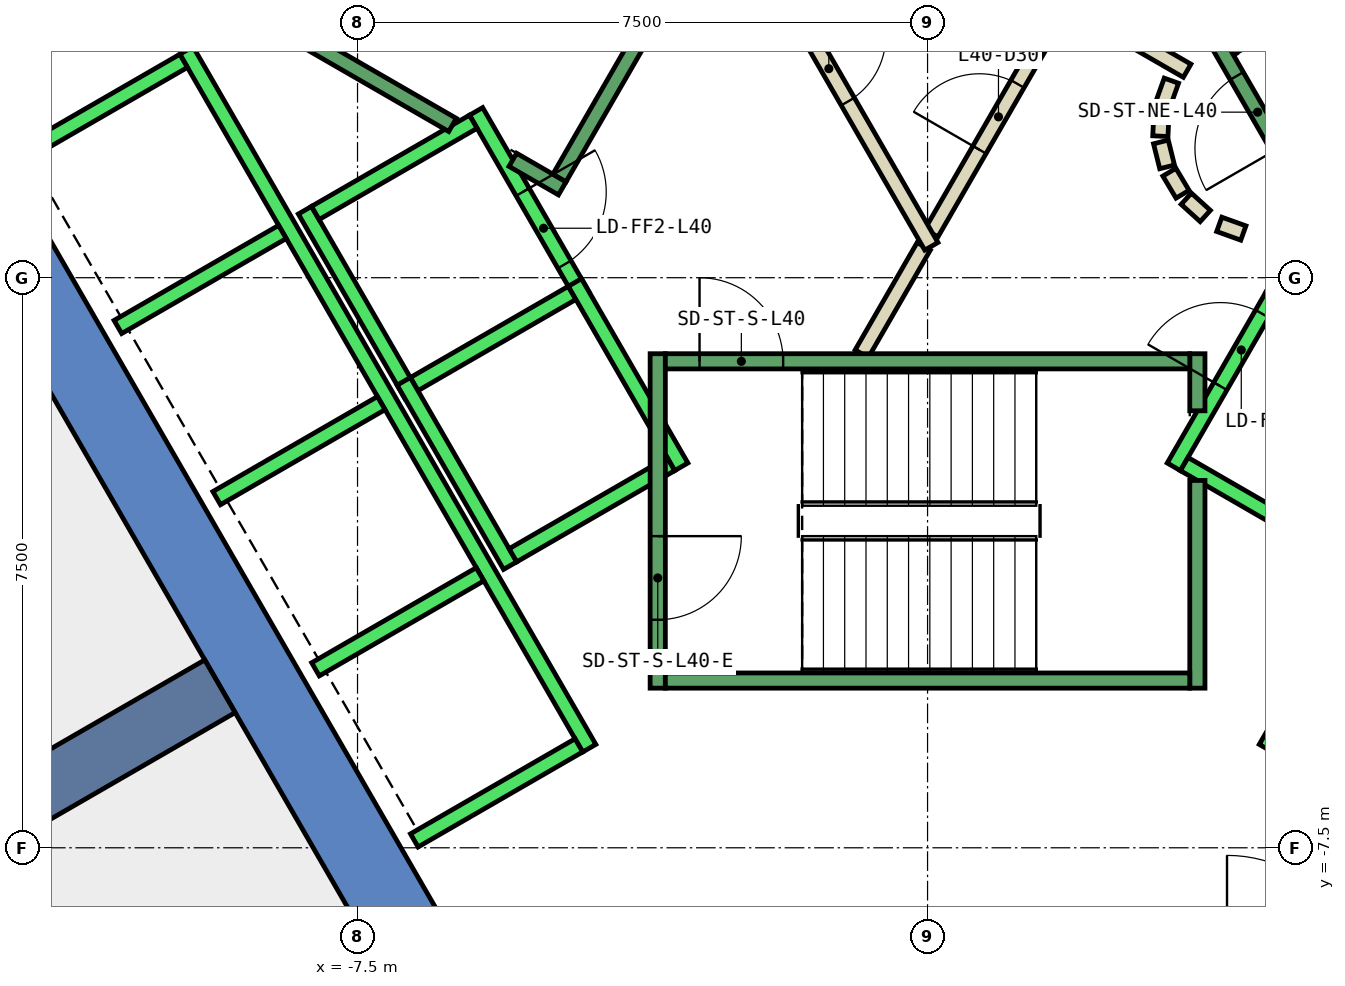
"""IFC4 building model, lengths in metres.
Left out: names, types, materials, properties, quantities, classifications, styles, units other than length and angle.
Written with IfcOpenShell. Run it as: python <this file> out.ifc"""

import sys

from ifc_helpers import new_model, si_unit, direction, frame, frame_2d, origin, place, context, subcontext, project, spatial, polyline, rectangle, outline, extrude, element, fill, save


model = new_model("IFC4")
c1 = context("Model", 3, precision=1e-05, world=origin(), true_north=direction((0.0, 1.0)))
c2 = subcontext(c1, "Body", "Model", "MODEL_VIEW")
j1 = project(units=[si_unit("LENGTHUNIT", "METRE"), si_unit("PLANEANGLEUNIT", "RADIAN")], contexts=[c1])
p1 = place(None, origin())
s1 = spatial("IfcSite", under=j1, at=p1, CompositionType="ELEMENT")
p2 = place(p1, origin())
s2 = spatial("IfcBuilding", under=s1, at=p2, CompositionType="ELEMENT")
p3 = place(p2, frame((0.0, 0.0, 180.2)))
s3 = spatial("IfcBuildingStorey", under=s2, at=p3, CompositionType="ELEMENT", Elevation=180.2)
p4 = place(p3, frame((0.0, 0.0, -0.4)))
e1 = element("IfcWall", 1, at=p4, inside=s3, PredefinedType="SHEAR", context=c2, shape_type="SweptSolid", body=[
    extrude(outline(polyline([(-13.856, 2.5), (-6.928, -9.5), (-6.351, -8.5), (-12.702, 2.5), (-13.856, 2.5)])), origin(), (0.0, 0.0, 1.0), 4.0),
])
p5 = place(p3, frame((-9.31, -5.375, -0.4), z_axis=(0.0, 0.0, 1.0), x_axis=(-0.866017533419, -0.500013631625, 0.0)))
e2 = element("IfcWall", 2, at=p5, inside=s3, PredefinedType="SHEAR", context=c2, shape_type="SweptSolid", body=[
    extrude(rectangle(XDim=9.0, YDim=0.8, at=frame_2d((4.5, 0.0))), origin(), (0.0, 0.0, 1.0), 4.0),
])
p6 = place(p3, frame((-0.866, -1.0, 0.0), z_axis=(0.0, 0.0, 1.0), x_axis=(0.500033287521, 0.866006184372, 0.0)))
e3 = element("IfcWall", 3, at=p6, inside=s3, PredefinedType="PARTITIONING", context=c2, shape_type="SweptSolid", body=[
    extrude(rectangle(XDim=1.632, YDim=0.2, at=frame_2d((0.816, 0.0))), origin(), (0.0, 0.0, 1.0), 3.6),
])
p7 = place(p3, frame((0.05, 0.587, 0.0), z_axis=(0.0, 0.0, 1.0), x_axis=(0.500028932171, 0.866008699143, 0.0)))
e4 = element("IfcWall", 4, at=p7, inside=s3, PredefinedType="PARTITIONING", context=c2, shape_type="SweptSolid", body=[
    extrude(rectangle(XDim=3.632, YDim=0.2, at=frame_2d((1.816, 0.0))), origin(), (0.0, 0.0, 1.0), 3.6),
])
p8 = place(p7, frame((1.266, 0.0, 0.0)))
e5 = element("IfcOpeningElement", 5, at=p8, cuts=e4, PredefinedType="OPENING", context=c2, shape_type="SweptSolid", body=[
    extrude(rectangle(XDim=1.0, YDim=2.1, at=frame_2d((0.5, 1.05))), frame((0.0, 0.11, 0.0), z_axis=(0.0, -1.0, 0.0), x_axis=(1.0, 0.0, 0.0)), (0.0, 0.0, 1.0), 0.22),
])
p9 = place(p3, frame((1.903, 3.595, 0.0), z_axis=(0.0, 0.0, 1.0), x_axis=(0.866239139897, -0.499629615326, 0.0)))
e6 = element("IfcWall", 6, at=p9, inside=s3, PredefinedType="PARTITIONING", context=c2, shape_type="SweptSolid", body=[
    extrude(rectangle(XDim=1.745, YDim=0.2, at=frame_2d((0.873, 0.0))), origin(), (0.0, 0.0, 1.0), 3.6),
])
p10 = place(p3, frame((3.208, 2.592, 0.0), z_axis=(0.0, 0.0, 1.0), x_axis=(-0.337388820924, -0.941365382578, 0.0)))
e7 = element("IfcWall", 7, at=p10, inside=s3, PredefinedType="PARTITIONING", context=c2, shape_type="SweptSolid", body=[
    extrude(rectangle(XDim=0.338, YDim=0.2, at=frame_2d((0.169, 0.0))), origin(), (0.0, 0.0, 1.0), 3.6),
])
p11 = place(p3, frame((3.079, 2.199, 0.0), z_axis=(0.0, 0.0, 1.0), x_axis=(-0.047771483479, -0.998858290933, 0.0)))
e8 = element("IfcWall", 8, at=p11, inside=s3, PredefinedType="PARTITIONING", context=c2, shape_type="SweptSolid", body=[
    extrude(rectangle(XDim=0.337, YDim=0.2, at=frame_2d((0.169, 0.0))), origin(), (0.0, 0.0, 1.0), 3.6),
])
p12 = place(p3, frame((3.07, 1.786, 0.0), z_axis=(0.0, 0.0, 1.0), x_axis=(0.242705583207, -0.970099994784, 0.0)))
e9 = element("IfcWall", 9, at=p12, inside=s3, PredefinedType="PARTITIONING", context=c2, shape_type="SweptSolid", body=[
    extrude(rectangle(XDim=0.338, YDim=0.2, at=frame_2d((0.169, 0.0))), origin(), (0.0, 0.0, 1.0), 3.6),
])
for number, where, z_axis, x_axis in (
    (10, (3.182, 1.388, 0.0), (0.0, 0.0, 1.0), (0.512, -0.859, 0.0)),
    (11, (3.404, 1.039, 0.0), (0.0, 0.0, 1.0), (0.74, -0.672, 0.0)),
):
    element("IfcWall", number, at=place(p3, frame(where, z_axis=z_axis, x_axis=x_axis)), inside=s3, PredefinedType="PARTITIONING", context=c2, shape_type="SweptSolid", body=[
        extrude(rectangle(XDim=0.338, YDim=0.2, at=frame_2d((0.169, 0.0))), origin(), (0.0, 0.0, 1.0), 3.6),
    ])
p13 = place(p3, frame((3.838, 0.702, 0.0), z_axis=(0.0, 0.0, 1.0), x_axis=(0.941035081519, -0.338308993895, 0.0)))
e12 = element("IfcWall", 12, at=p13, inside=s3, PredefinedType="PARTITIONING", context=c2, shape_type="SweptSolid", body=[
    extrude(rectangle(XDim=0.337, YDim=0.2, at=frame_2d((0.168, 0.0))), origin(), (0.0, 0.0, 1.0), 3.6),
])
p14 = place(p3, frame((-2.598, 5.0, 0.0), z_axis=(0.0, 0.0, 1.0), x_axis=(0.49995654735, -0.86605048973, 0.0)))
e13 = element("IfcWall", 13, at=p14, inside=s3, PredefinedType="PARTITIONING", context=c2, shape_type="SweptSolid", body=[
    extrude(rectangle(XDim=5.296, YDim=0.2, at=frame_2d((2.648, 0.0))), origin(), (0.0, 0.0, 1.0), 3.6),
])
p15 = place(p14, frame((2.098, 0.0, 0.0)))
e14 = element("IfcOpeningElement", 14, at=p15, cuts=e13, PredefinedType="OPENING", context=c2, shape_type="SweptSolid", body=[
    extrude(rectangle(XDim=1.0, YDim=2.1, at=frame_2d((0.5, 1.05))), frame((0.0, 0.11, 0.0), z_axis=(0.0, -1.0, 0.0), x_axis=(1.0, 0.0, 0.0)), (0.0, 0.0, 1.0), 0.22),
])
p16 = place(p3, frame((-5.94, 2.188, 0.0), z_axis=(0.0, 0.0, 1.0), x_axis=(0.49994636267, -0.866056369097, 0.0)))
e15 = element("IfcWall", 15, at=p16, inside=s3, PredefinedType="STANDARD", context=c2, shape_type="SweptSolid", body=[
    extrude(rectangle(XDim=2.8, YDim=0.2, at=frame_2d((1.4, 0.0))), origin(), (0.0, 0.0, 1.0), 3.6),
])
p17 = place(p16, frame((1.225, 0.0, 0.0)))
e16 = element("IfcOpeningElement", 16, at=p17, cuts=e15, PredefinedType="OPENING", context=c2, shape_type="SweptSolid", body=[
    extrude(rectangle(XDim=1.1, YDim=2.1, at=frame_2d((0.55, 1.05))), frame((0.0, 0.11, 0.0), z_axis=(0.0, -1.0, 0.0), x_axis=(1.0, 0.0, 0.0)), (0.0, 0.0, 1.0), 0.22),
])
p18 = place(p3, frame((-8.192, 0.888, 0.0), z_axis=(0.0, 0.0, 1.0), x_axis=(0.49994636267, -0.866056369097, 0.0)))
e17 = element("IfcWall", 17, at=p18, inside=s3, PredefinedType="STANDARD", context=c2, shape_type="SweptSolid", body=[
    extrude(rectangle(XDim=2.8, YDim=0.2, at=frame_2d((1.4, 0.0))), origin(), (0.0, 0.0, 1.0), 3.6),
])
for number, where, z_axis, x_axis in (
    (18, (-5.977, 2.052, 0.0), (0.0, 0.0, 1.0), (-0.866, -0.5, 0.0)),
    (19, (-4.677, -0.2, 0.0), (0.0, 0.0, 1.0), (-0.866, -0.5, 0.0)),
):
    element("IfcWall", number, at=place(p3, frame(where, z_axis=z_axis, x_axis=x_axis)), inside=s3, PredefinedType="STANDARD", context=c2, shape_type="SweptSolid", body=[
        extrude(rectangle(XDim=2.399, YDim=0.2, at=frame_2d((1.2, 0.0))), origin(), (0.0, 0.0, 1.0), 3.6),
    ])
p19 = place(p3, frame((-9.751, 2.99, 0.0), z_axis=(0.0, 0.0, 1.0), x_axis=(0.50000090737, -0.866024879913, 0.0)))
e20 = element("IfcWall", 20, at=p19, inside=s3, PredefinedType="STANDARD", context=c2, shape_type="SweptSolid", body=[
    extrude(rectangle(XDim=10.6, YDim=0.2, at=frame_2d((5.3, 0.0))), origin(), (0.0, 0.0, 1.0), 3.6),
])
p20 = place(p3, frame((-9.788, 2.853, 0.0), z_axis=(0.0, 0.0, 1.0), x_axis=(-0.865998541277, -0.500046524342, 0.0)))
e21 = element("IfcWall", 21, at=p20, inside=s3, PredefinedType="STANDARD", context=c2, shape_type="SweptSolid", body=[
    extrude(rectangle(XDim=2.5, YDim=0.2, at=frame_2d((1.25, 0.0))), origin(), (0.0, 0.0, 1.0), 3.6),
])
for number, where, z_axis, x_axis in (
    (22, (-8.488, 0.602, 0.0), (0.0, 0.0, 1.0), (-0.866, -0.5, 0.0)),
    (23, (-7.188, -1.65, 0.0), (0.0, 0.0, 1.0), (-0.866, -0.5, 0.0)),
    (24, (-5.888, -3.902, 0.0), (0.0, 0.0, 1.0), (-0.866, -0.5, 0.0)),
    (25, (-4.588, -6.153, 0.0), (0.0, 0.0, 1.0), (-0.866, -0.5, 0.0)),
):
    element("IfcWall", number, at=place(p3, frame(where, z_axis=z_axis, x_axis=x_axis)), inside=s3, PredefinedType="STANDARD", context=c2, shape_type="SweptSolid", body=[
        extrude(rectangle(XDim=2.5, YDim=0.2, at=frame_2d((1.25, 0.0))), origin(), (0.0, 0.0, 1.0), 3.6),
    ])
p21 = place(p3, frame((3.24, -2.488, 0.0), z_axis=(0.0, 0.0, 1.0), x_axis=(0.49994636267, 0.866056369097, 0.0)))
e26 = element("IfcWall", 26, at=p21, inside=s3, PredefinedType="STANDARD", context=c2, shape_type="SweptSolid", body=[
    extrude(rectangle(XDim=2.8, YDim=0.2, at=frame_2d((1.4, 0.0))), origin(), (0.0, 0.0, 1.0), 3.6),
])
p22 = place(p21, frame((1.225, 0.0, 0.0)))
e27 = element("IfcOpeningElement", 27, at=p22, cuts=e26, PredefinedType="OPENING", context=c2, shape_type="SweptSolid", body=[
    extrude(rectangle(XDim=1.1, YDim=2.1, at=frame_2d((0.55, 1.05))), frame((0.0, 0.11, 0.0), z_axis=(0.0, -1.0, 0.0), x_axis=(1.0, 0.0, 0.0)), (0.0, 0.0, 1.0), 0.22),
])
p23 = place(p3, frame((3.377, -2.452, 0.0), z_axis=(0.0, 0.0, 1.0), x_axis=(0.865955154139, -0.50012165622, 0.0)))
e28 = element("IfcWall", 28, at=p23, inside=s3, PredefinedType="STANDARD", context=c2, shape_type="SweptSolid", body=[
    extrude(rectangle(XDim=2.4, YDim=0.2, at=frame_2d((1.2, 0.0))), origin(), (0.0, 0.0, 1.0), 3.6),
])
p24 = place(p3, frame((4.451, -6.19, 0.0), z_axis=(0.0, 0.0, 1.0), x_axis=(0.50000090737, 0.866024879913, 0.0)))
e29 = element("IfcWall", 29, at=p24, inside=s3, PredefinedType="STANDARD", context=c2, shape_type="SweptSolid", body=[
    extrude(rectangle(XDim=10.6, YDim=0.2, at=frame_2d((5.3, 0.0))), origin(), (0.0, 0.0, 1.0), 3.6),
])
p25 = place(p3, frame((-4.64, -0.063, 0.0), z_axis=(0.0, 0.0, 1.0), x_axis=(0.49994636267, -0.866056369097, 0.0)))
e30 = element("IfcWall", 30, at=p25, inside=s3, PredefinedType="STANDARD", context=c2, shape_type="SweptSolid", body=[
    extrude(rectangle(XDim=2.8, YDim=0.2, at=frame_2d((1.4, 0.0))), origin(), (0.0, 0.0, 1.0), 2.3),
])
p26 = place(p3, frame((-6.892, -1.363, 0.0), z_axis=(0.0, 0.0, 1.0), x_axis=(0.500011755427, -0.866018616679, 0.0)))
e31 = element("IfcWall", 31, at=p26, inside=s3, PredefinedType="STANDARD", context=c2, shape_type="SweptSolid", body=[
    extrude(rectangle(XDim=2.8, YDim=0.2, at=frame_2d((1.4, 0.0))), origin(), (0.0, 0.0, 1.0), 2.3),
])
p27 = place(p3, frame((-3.377, -2.452, 0.0), z_axis=(0.0, 0.0, 1.0), x_axis=(-0.865955154139, -0.50012165622, 0.0)))
e32 = element("IfcWall", 32, at=p27, inside=s3, PredefinedType="STANDARD", context=c2, shape_type="SweptSolid", body=[
    extrude(rectangle(XDim=2.4, YDim=0.2, at=frame_2d((1.2, 0.0))), origin(), (0.0, 0.0, 1.0), 2.3),
])
p28 = place(p3, frame((-3.55, -1.0, 0.0), z_axis=(0.0, 0.0, 1.0), x_axis=(0.0, -1.0, 0.0)))
e33 = element("IfcWall", 33, at=p28, inside=s3, PredefinedType="STANDARD", context=c2, shape_type="SweptSolid", body=[
    extrude(rectangle(XDim=4.4, YDim=0.2, at=frame_2d((2.2, 0.0))), origin(), (0.0, 0.0, 1.0), 3.6),
])
p29 = place(p28, frame((2.4, 0.0, 0.0)))
e34 = element("IfcOpeningElement", 34, at=p29, cuts=e33, PredefinedType="OPENING", context=c2, shape_type="SweptSolid", body=[
    extrude(rectangle(XDim=1.1, YDim=2.2, at=frame_2d((0.55, 1.1))), frame((0.0, 0.11, 0.0), z_axis=(0.0, -1.0, 0.0), x_axis=(1.0, 0.0, 0.0)), (0.0, 0.0, 1.0), 0.22),
])
p30 = place(p3, frame((3.55, -2.667, 0.0), z_axis=(0.0, 0.0, 1.0), x_axis=(0.0, -1.0, 0.0)))
e35 = element("IfcWall", 35, at=p30, inside=s3, PredefinedType="STANDARD", context=c2, shape_type="SweptSolid", body=[
    extrude(rectangle(XDim=2.733, YDim=0.2, at=frame_2d((1.366, 0.0))), origin(), (0.0, 0.0, 1.0), 3.6),
])
p31 = place(p3, frame((3.55, -1.0, 0.0), z_axis=(0.0, 0.0, 1.0), x_axis=(0.0, -1.0, 0.0)))
e36 = element("IfcWall", 36, at=p31, inside=s3, PredefinedType="STANDARD", context=c2, shape_type="SweptSolid", body=[
    extrude(rectangle(XDim=0.751, YDim=0.2, at=frame_2d((0.375, 0.0))), origin(), (0.0, 0.0, 1.0), 3.6),
])
p32 = place(p3, frame((-3.45, -1.1, 0.0), z_axis=(0.0, 0.0, 1.0), x_axis=(1.0, 0.0, 0.0)))
e37 = element("IfcWall", 37, at=p32, inside=s3, PredefinedType="STANDARD", context=c2, shape_type="SweptSolid", body=[
    extrude(rectangle(XDim=6.9, YDim=0.2, at=frame_2d((3.45, 0.0))), origin(), (0.0, 0.0, 1.0), 3.6),
])
p33 = place(p32, frame((0.45, 0.0, 0.0)))
e38 = element("IfcOpeningElement", 38, at=p33, cuts=e37, PredefinedType="OPENING", context=c2, shape_type="SweptSolid", body=[
    extrude(rectangle(XDim=1.1, YDim=2.2, at=frame_2d((0.55, 1.1))), frame((0.0, 0.11, 0.0), z_axis=(0.0, -1.0, 0.0), x_axis=(1.0, 0.0, 0.0)), (0.0, 0.0, 1.0), 0.22),
])
p34 = place(p3, frame((-3.45, -5.3, 0.0), z_axis=(0.0, 0.0, 1.0), x_axis=(1.0, 0.0, 0.0)))
e39 = element("IfcWall", 39, at=p34, inside=s3, PredefinedType="STANDARD", context=c2, shape_type="SweptSolid", body=[
    extrude(rectangle(XDim=6.9, YDim=0.2, at=frame_2d((3.45, 0.0))), origin(), (0.0, 0.0, 1.0), 3.6),
])
p35 = place(p3, frame((4.843, 1.312, 0.0), z_axis=(0.0, 0.0, 1.0), x_axis=(-0.499963383562, 0.866046543262, 0.0)))
e40 = element("IfcWall", 40, at=p35, inside=s3, PredefinedType="STANDARD", context=c2, shape_type="SweptSolid", body=[
    extrude(rectangle(XDim=6.9, YDim=0.2, at=frame_2d((3.45, 0.0))), origin(), (0.0, 0.0, 1.0), 3.6),
])
p36 = place(p35, frame((0.45, 0.0, 0.0)))
e41 = element("IfcOpeningElement", 41, at=p36, cuts=e40, PredefinedType="OPENING", context=c2, shape_type="SweptSolid", body=[
    extrude(rectangle(XDim=1.1, YDim=2.2, at=frame_2d((0.55, 1.1))), frame((0.0, 0.11, 0.0), z_axis=(0.0, -1.0, 0.0), x_axis=(1.0, 0.0, 0.0)), (0.0, 0.0, 1.0), 0.22),
])
p37 = place(p3, frame((-6.25, 2.01, 0.0), z_axis=(0.0, 0.0, 1.0), x_axis=(-0.86611865017, 0.499838457731, 0.0)))
e42 = element("IfcWall", 42, at=p37, inside=s3, PredefinedType="STANDARD", context=c2, shape_type="SweptSolid", body=[
    extrude(rectangle(XDim=2.733, YDim=0.2, at=frame_2d((1.366, 0.0))), origin(), (0.0, 0.0, 1.0), 3.6),
])
p38 = place(p3, frame((-4.806, 1.176, 0.0), z_axis=(0.0, 0.0, 1.0), x_axis=(-0.866558586415, 0.499075361355, 0.0)))
e43 = element("IfcWall", 43, at=p38, inside=s3, PredefinedType="STANDARD", context=c2, shape_type="SweptSolid", body=[
    extrude(rectangle(XDim=0.751, YDim=0.2, at=frame_2d((0.376, 0.0))), origin(), (0.0, 0.0, 1.0), 3.6),
])
p39 = place(p3, frame((-1.393, 7.288, 0.0), z_axis=(0.0, 0.0, 1.0), x_axis=(-0.499963383562, -0.866046543262, 0.0)))
e44 = element("IfcWall", 44, at=p39, inside=s3, PredefinedType="STANDARD", context=c2, shape_type="SweptSolid", body=[
    extrude(rectangle(XDim=6.9, YDim=0.2, at=frame_2d((3.45, 0.0))), origin(), (0.0, 0.0, 1.0), 3.6),
])
p40 = place(p39, frame((0.45, 0.0, 0.0)))
e45 = element("IfcOpeningElement", 45, at=p40, cuts=e44, PredefinedType="OPENING", context=c2, shape_type="SweptSolid", body=[
    extrude(rectangle(XDim=1.1, YDim=2.2, at=frame_2d((0.55, 1.1))), frame((0.0, 0.11, 0.0), z_axis=(0.0, -1.0, 0.0), x_axis=(1.0, 0.0, 0.0)), (0.0, 0.0, 1.0), 0.22),
])
p41 = place(p8, origin())
e46 = element("IfcDoor", 46, at=p41, inside=s3, OperationType="SINGLE_SWING_RIGHT", PredefinedType="DOOR", context=c2, shape_type="SweptSolid", body=[
    extrude(rectangle(XDim=1.0, YDim=2.1, at=frame_2d((0.5, 1.05))), frame((0.0, 0.025, 0.0), z_axis=(0.0, -1.0, 0.0), x_axis=(1.0, 0.0, 0.0)), (0.0, 0.0, 1.0), 0.05),
])
fill(e5, e46)
p42 = place(p15, origin())
e47 = element("IfcDoor", 47, at=p42, inside=s3, OperationType="SINGLE_SWING_RIGHT", PredefinedType="DOOR", context=c2, shape_type="SweptSolid", body=[
    extrude(rectangle(XDim=1.0, YDim=2.1, at=frame_2d((0.5, 1.05))), frame((0.0, 0.025, 0.0), z_axis=(0.0, -1.0, 0.0), x_axis=(1.0, 0.0, 0.0)), (0.0, 0.0, 1.0), 0.05),
])
fill(e14, e47)
p43 = place(p22, origin())
e48 = element("IfcDoor", 48, at=p43, inside=s3, OperationType="SLIDING_TO_LEFT", PredefinedType="DOOR", context=c2, shape_type="SweptSolid", body=[
    extrude(rectangle(XDim=1.1, YDim=2.1, at=frame_2d((0.55, 1.05))), frame((0.0, 0.025, 0.0), z_axis=(0.0, -1.0, 0.0), x_axis=(1.0, 0.0, 0.0)), (0.0, 0.0, 1.0), 0.05),
])
fill(e27, e48)
p44 = place(p17, origin())
e49 = element("IfcDoor", 49, at=p44, inside=s3, OperationType="SLIDING_TO_LEFT", PredefinedType="DOOR", context=c2, shape_type="SweptSolid", body=[
    extrude(rectangle(XDim=1.1, YDim=2.1, at=frame_2d((0.55, 1.05))), frame((0.0, 0.025, 0.0), z_axis=(0.0, -1.0, 0.0), x_axis=(1.0, 0.0, 0.0)), (0.0, 0.0, 1.0), 0.05),
])
fill(e16, e49)
p45 = place(p33, origin())
e50 = element("IfcDoor", 50, at=p45, inside=s3, OperationType="SINGLE_SWING_LEFT", PredefinedType="DOOR", context=c2, shape_type="SweptSolid", body=[
    extrude(rectangle(XDim=1.1, YDim=2.2, at=frame_2d((0.55, 1.1))), frame((0.0, 0.025, 0.0), z_axis=(0.0, -1.0, 0.0), x_axis=(1.0, 0.0, 0.0)), (0.0, 0.0, 1.0), 0.05),
])
fill(e38, e50)
p46 = place(p29, origin())
e51 = element("IfcDoor", 51, at=p46, inside=s3, OperationType="SINGLE_SWING_LEFT", PredefinedType="DOOR", context=c2, shape_type="SweptSolid", body=[
    extrude(rectangle(XDim=1.1, YDim=2.2, at=frame_2d((0.55, 1.1))), frame((0.0, 0.025, 0.0), z_axis=(0.0, -1.0, 0.0), x_axis=(1.0, 0.0, 0.0)), (0.0, 0.0, 1.0), 0.05),
])
fill(e34, e51)
p47 = place(p36, origin())
e52 = element("IfcDoor", 52, at=p47, inside=s3, OperationType="SINGLE_SWING_LEFT", PredefinedType="DOOR", context=c2, shape_type="SweptSolid", body=[
    extrude(rectangle(XDim=1.1, YDim=2.2, at=frame_2d((0.55, 1.1))), frame((0.0, 0.025, 0.0), z_axis=(0.0, -1.0, 0.0), x_axis=(1.0, 0.0, 0.0)), (0.0, 0.0, 1.0), 0.05),
])
fill(e41, e52)
save(model, sys.argv[1])
